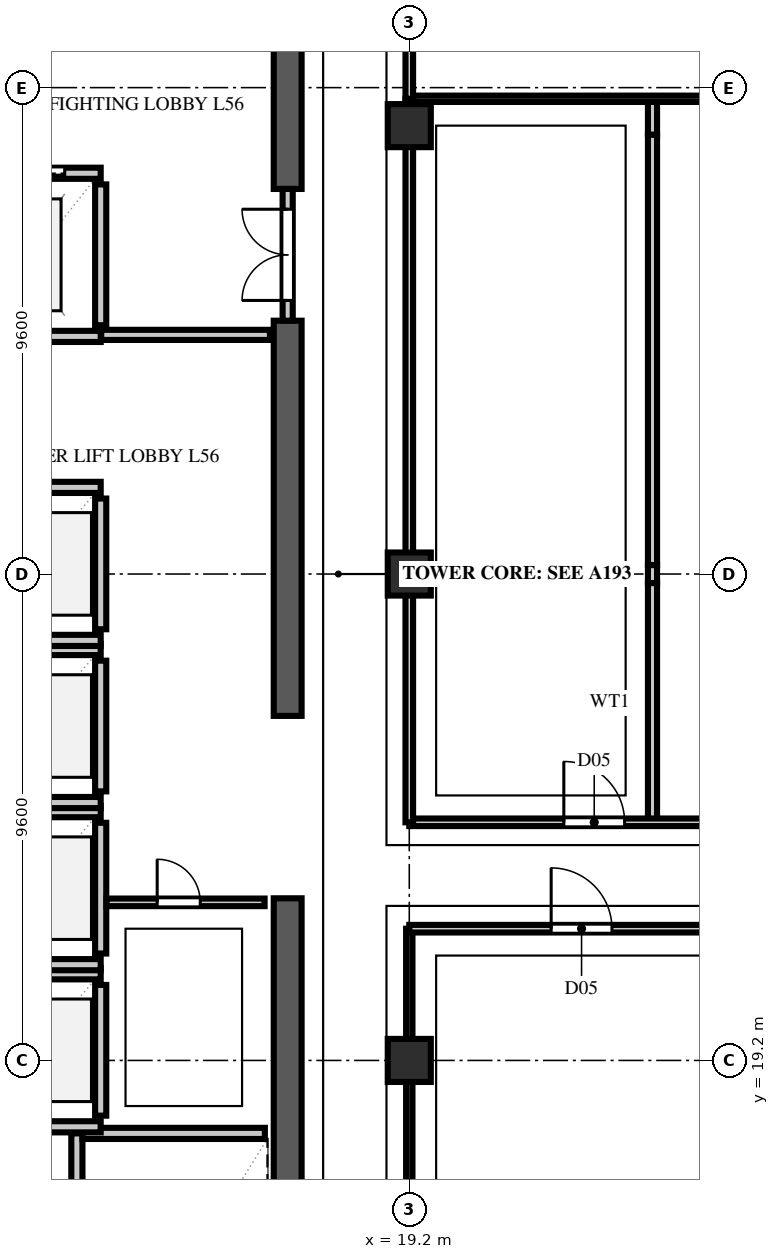
"""IFC4 building model, lengths in metres.
Left out: names, types, materials, properties, quantities, classifications, styles, units other than length and angle.
Written with IfcOpenShell. Run it as: python <this file> out.ifc"""

import sys

from ifc_helpers import new_model, si_unit, direction, frame, frame_2d, origin, origin_2d, place, context, subcontext, project, spatial, rectangle, extrude, element, fill, save


model = new_model("IFC4")
c1 = context("Model", 3, precision=1e-05, world=origin(), true_north=direction((0.0, 1.0)))
c2 = subcontext(c1, "Body", "Model", "MODEL_VIEW")
j1 = project(units=[si_unit("LENGTHUNIT", "METRE"), si_unit("PLANEANGLEUNIT", "RADIAN")], contexts=[c1])
p1 = place(None, origin())
s1 = spatial("IfcSite", under=j1, at=p1, CompositionType="ELEMENT")
p2 = place(p1, origin())
s2 = spatial("IfcBuilding", under=s1, at=p2, CompositionType="ELEMENT")
p3 = place(p2, frame((0.0, 0.0, 221.8)))
s3 = spatial("IfcBuildingStorey", under=s2, at=p3, CompositionType="ELEMENT", Elevation=221.8)
p4 = place(p3, frame((16.8, 9.875, 0.0), z_axis=(0.0, 0.0, 1.0), x_axis=(0.0, 1.0, 0.0)))
e1 = element("IfcWall", 1, at=p4, inside=s3, PredefinedType="SHEAR", context=c2, shape_type="SweptSolid", body=[
    extrude(rectangle(XDim=12.525, YDim=0.55, at=frame_2d((6.262, 0.0))), origin(), (0.0, 0.0, 1.0), 3.54),
])
p5 = place(p4, frame((0.265, 0.0, 0.0)))
e2 = element("IfcOpeningElement", 2, at=p5, cuts=e1, PredefinedType="OPENING", context=c2, shape_type="SweptSolid", body=[
    extrude(rectangle(XDim=1.1, YDim=2.2, at=frame_2d((0.55, 1.1))), frame((0.0, 0.287, 0.0), z_axis=(0.0, -1.0, 0.0), x_axis=(1.0, 0.0, 0.0)), (0.0, 0.0, 1.0), 0.574),
])
p6 = place(p3, frame((16.8, 26.0, 0.0), z_axis=(0.0, 0.0, 1.0), x_axis=(0.0, 1.0, 0.0)))
e3 = element("IfcWall", 3, at=p6, inside=s3, PredefinedType="SHEAR", context=c2, shape_type="SweptSolid", body=[
    extrude(rectangle(XDim=7.8, YDim=0.55, at=frame_2d((3.9, 0.0))), origin(), (0.0, 0.0, 1.0), 3.54),
])
p7 = place(p3, frame((16.8, 36.4, 0.0), z_axis=(0.0, 0.0, 1.0), x_axis=(0.0, 1.0, 0.0)))
e4 = element("IfcWall", 4, at=p7, inside=s3, PredefinedType="SHEAR", context=c2, shape_type="SweptSolid", body=[
    extrude(rectangle(XDim=11.325, YDim=0.55, at=frame_2d((5.663, 0.0))), origin(), (0.0, 0.0, 1.0), 3.54),
])
p8 = place(p7, frame((9.2, 0.0, 0.0)))
e5 = element("IfcOpeningElement", 5, at=p8, cuts=e4, PredefinedType="OPENING", context=c2, shape_type="SweptSolid", body=[
    extrude(rectangle(XDim=0.95, YDim=2.15, at=frame_2d((0.475, 1.075))), frame((0.0, 0.287, 0.0), z_axis=(0.0, -1.0, 0.0), x_axis=(1.0, 0.0, 0.0)), (0.0, 0.0, 1.0), 0.574),
])
for number, where, z_axis, x_axis in (
    (6, (19.2, 19.2, 0.0), (0.0, 0.0, 1.0), (1.0, 0.0, 0.0)),
    (7, (19.2, 28.8, 0.0), (0.0, 0.0, 1.0), (1.0, 0.0, 0.0)),
    (8, (19.2, 37.65, 0.0), (0.0, 0.0, 1.0), (1.0, 0.0, 0.0)),
):
    element("IfcColumn", number, at=place(p3, frame(where, z_axis=z_axis, x_axis=x_axis)), inside=s3, PredefinedType="COLUMN", context=c2, shape_type="SweptSolid", body=[
        extrude(rectangle(XDim=0.85, YDim=0.85, at=origin_2d()), origin(), (0.0, 0.0, 1.0), 3.8),
    ])
p9 = place(p3, frame((12.64, 10.05, 0.0), z_axis=(0.0, 0.0, 1.0), x_axis=(0.0, 1.0, 0.0)))
e9 = element("IfcWall", 9, at=p9, inside=s3, PredefinedType="SOLIDWALL", context=c2, shape_type="SweptSolid", body=[
    extrude(rectangle(XDim=7.71, YDim=0.22, at=frame_2d((3.855, 0.0))), origin(), (0.0, 0.0, 1.0), 3.54),
])
p10 = place(p3, frame((12.75, 17.76, 0.0), z_axis=(0.0, 0.0, 1.0), x_axis=(1.0, 0.0, 0.0)))
e10 = element("IfcWall", 10, at=p10, inside=s3, PredefinedType="SOLIDWALL", context=c2, shape_type="SweptSolid", body=[
    extrude(rectangle(XDim=3.6, YDim=0.22, at=frame_2d((1.8, 0.0))), origin(), (0.0, 0.0, 1.0), 3.54),
])
p11 = place(p3, frame((13.11, 18.11, 0.0), z_axis=(0.0, 0.0, 1.0), x_axis=(0.0, 1.0, 0.0)))
e11 = element("IfcWall", 11, at=p11, inside=s3, PredefinedType="SOLIDWALL", context=c2, shape_type="SweptSolid", body=[
    extrude(rectangle(XDim=2.58, YDim=0.22, at=frame_2d((1.29, 0.0))), origin(), (0.0, 0.0, 1.0), 3.54),
])
for number, where, z_axis, x_axis in (
    (12, (10.49, 17.89, 0.0), (0.0, 0.0, 1.0), (1.0, 0.0, 0.0)),
    (13, (10.49, 20.91, 0.0), (0.0, 0.0, 1.0), (1.0, 0.0, 0.0)),
):
    element("IfcWall", number, at=place(p3, frame(where, z_axis=z_axis, x_axis=x_axis)), inside=s3, PredefinedType="SOLIDWALL", context=c2, shape_type="SweptSolid", body=[
        extrude(rectangle(XDim=2.62, YDim=0.22, at=frame_2d((1.31, 0.0))), origin(), (0.0, 0.0, 1.0), 3.54),
    ])
p12 = place(p3, frame((13.11, 21.31, 0.0), z_axis=(0.0, 0.0, 1.0), x_axis=(0.0, 1.0, 0.0)))
e14 = element("IfcWall", 14, at=p12, inside=s3, PredefinedType="SOLIDWALL", context=c2, shape_type="SweptSolid", body=[
    extrude(rectangle(XDim=2.58, YDim=0.22, at=frame_2d((1.29, 0.0))), origin(), (0.0, 0.0, 1.0), 3.54),
])
for number, where, z_axis, x_axis in (
    (15, (10.49, 21.09, 0.0), (0.0, 0.0, 1.0), (1.0, 0.0, 0.0)),
    (16, (10.49, 24.11, 0.0), (0.0, 0.0, 1.0), (1.0, 0.0, 0.0)),
):
    element("IfcWall", number, at=place(p3, frame(where, z_axis=z_axis, x_axis=x_axis)), inside=s3, PredefinedType="SOLIDWALL", context=c2, shape_type="SweptSolid", body=[
        extrude(rectangle(XDim=2.62, YDim=0.22, at=frame_2d((1.31, 0.0))), origin(), (0.0, 0.0, 1.0), 3.54),
    ])
p13 = place(p3, frame((13.11, 24.51, 0.0), z_axis=(0.0, 0.0, 1.0), x_axis=(0.0, 1.0, 0.0)))
e17 = element("IfcWall", 17, at=p13, inside=s3, PredefinedType="SOLIDWALL", context=c2, shape_type="SweptSolid", body=[
    extrude(rectangle(XDim=2.58, YDim=0.22, at=frame_2d((1.29, 0.0))), origin(), (0.0, 0.0, 1.0), 3.54),
])
for number, where, z_axis, x_axis in (
    (18, (10.49, 24.29, 0.0), (0.0, 0.0, 1.0), (1.0, 0.0, 0.0)),
    (19, (10.49, 27.31, 0.0), (0.0, 0.0, 1.0), (1.0, 0.0, 0.0)),
):
    element("IfcWall", number, at=place(p3, frame(where, z_axis=z_axis, x_axis=x_axis)), inside=s3, PredefinedType="SOLIDWALL", context=c2, shape_type="SweptSolid", body=[
        extrude(rectangle(XDim=2.62, YDim=0.22, at=frame_2d((1.31, 0.0))), origin(), (0.0, 0.0, 1.0), 3.54),
    ])
p14 = place(p3, frame((13.11, 27.71, 0.0), z_axis=(0.0, 0.0, 1.0), x_axis=(0.0, 1.0, 0.0)))
e20 = element("IfcWall", 20, at=p14, inside=s3, PredefinedType="SOLIDWALL", context=c2, shape_type="SweptSolid", body=[
    extrude(rectangle(XDim=2.58, YDim=0.22, at=frame_2d((1.29, 0.0))), origin(), (0.0, 0.0, 1.0), 3.54),
])
for number, where, z_axis, x_axis in (
    (21, (10.49, 27.49, 0.0), (0.0, 0.0, 1.0), (1.0, 0.0, 0.0)),
    (22, (10.49, 30.51, 0.0), (0.0, 0.0, 1.0), (1.0, 0.0, 0.0)),
):
    element("IfcWall", number, at=place(p3, frame(where, z_axis=z_axis, x_axis=x_axis)), inside=s3, PredefinedType="SOLIDWALL", context=c2, shape_type="SweptSolid", body=[
        extrude(rectangle(XDim=2.62, YDim=0.22, at=frame_2d((1.31, 0.0))), origin(), (0.0, 0.0, 1.0), 3.54),
    ])
p15 = place(p3, frame((13.11, 33.71, 0.0), z_axis=(0.0, 0.0, 1.0), x_axis=(0.0, 1.0, 0.0)))
e23 = element("IfcWall", 23, at=p15, inside=s3, PredefinedType="SOLIDWALL", context=c2, shape_type="SweptSolid", body=[
    extrude(rectangle(XDim=2.78, YDim=0.22, at=frame_2d((1.39, 0.0))), origin(), (0.0, 0.0, 1.0), 3.54),
])
p16 = place(p3, frame((10.49, 33.49, 0.0), z_axis=(0.0, 0.0, 1.0), x_axis=(1.0, 0.0, 0.0)))
e24 = element("IfcWall", 24, at=p16, inside=s3, PredefinedType="SOLIDWALL", context=c2, shape_type="SweptSolid", body=[
    extrude(rectangle(XDim=2.62, YDim=0.22, at=frame_2d((1.31, 0.0))), origin(), (0.0, 0.0, 1.0), 3.54),
])
p17 = place(p3, frame((10.49, 36.71, 0.0), z_axis=(0.0, 0.0, 1.0), x_axis=(1.0, 0.0, 0.0)))
e25 = element("IfcWall", 25, at=p17, inside=s3, PredefinedType="SOLIDWALL", context=c2, shape_type="SweptSolid", body=[
    extrude(rectangle(XDim=2.62, YDim=0.22, at=frame_2d((1.31, 0.0))), origin(), (0.0, 0.0, 1.0), 3.54),
])
p18 = place(p17, frame((0.71, 0.0, 0.0)))
e26 = element("IfcOpeningElement", 26, at=p18, cuts=e25, PredefinedType="OPENING", context=c2, shape_type="SweptSolid", body=[
    extrude(rectangle(XDim=1.2, YDim=2.2, at=frame_2d((0.6, 1.1))), frame((0.0, 0.122, 0.0), z_axis=(0.0, -1.0, 0.0), x_axis=(1.0, 0.0, 0.0)), (0.0, 0.0, 1.0), 0.244),
])
p19 = place(p3, frame((13.12, 33.52, 0.0), z_axis=(0.0, 0.0, 1.0), x_axis=(1.0, 0.0, 0.0)))
e27 = element("IfcWall", 27, at=p19, inside=s3, PredefinedType="SOLIDWALL", context=c2, shape_type="SweptSolid", body=[
    extrude(rectangle(XDim=3.33, YDim=0.2, at=frame_2d((1.665, 0.0))), origin(), (0.0, 0.0, 1.0), 3.54),
])
p20 = place(p3, frame((16.8, 33.8, 0.0), z_axis=(0.0, 0.0, 1.0), x_axis=(0.0, 1.0, 0.0)))
e28 = element("IfcWall", 28, at=p20, inside=s3, PredefinedType="SOLIDWALL", context=c2, shape_type="SweptSolid", body=[
    extrude(rectangle(XDim=2.6, YDim=0.2, at=frame_2d((1.3, 0.0))), origin(), (0.0, 0.0, 1.0), 3.54),
])
p21 = place(p20, frame((0.4, 0.0, 0.0)))
e29 = element("IfcOpeningElement", 29, at=p21, cuts=e28, PredefinedType="OPENING", context=c2, shape_type="SweptSolid", body=[
    extrude(rectangle(XDim=1.8, YDim=2.2, at=frame_2d((0.9, 1.1))), frame((0.0, 0.112, 0.0), z_axis=(0.0, -1.0, 0.0), x_axis=(1.0, 0.0, 0.0)), (0.0, 0.0, 1.0), 0.224),
])
p22 = place(p3, frame((13.225, 22.32, 0.0), z_axis=(0.0, 0.0, 1.0), x_axis=(1.0, 0.0, 0.0)))
e30 = element("IfcWall", 30, at=p22, inside=s3, PredefinedType="PARTITIONING", context=c2, shape_type="SweptSolid", body=[
    extrude(rectangle(XDim=3.12, YDim=0.15, at=frame_2d((1.56, 0.0))), origin(), (0.0, 0.0, 1.0), 3.54),
])
p23 = place(p22, frame((1.0, 0.0, 0.0)))
e31 = element("IfcOpeningElement", 31, at=p23, cuts=e30, PredefinedType="OPENING", context=c2, shape_type="SweptSolid", body=[
    extrude(rectangle(XDim=0.85, YDim=2.1, at=frame_2d((0.425, 1.05))), frame((0.0, 0.087, 0.0), z_axis=(0.0, -1.0, 0.0), x_axis=(1.0, 0.0, 0.0)), (0.0, 0.0, 1.0), 0.174),
])
p24 = place(p3, frame((19.2, 0.75, 0.0), z_axis=(0.0, 0.0, 1.0), x_axis=(0.0, 1.0, 0.0)))
e32 = element("IfcWall", 32, at=p24, inside=s3, PredefinedType="PARTITIONING", context=c2, shape_type="SweptSolid", body=[
    extrude(rectangle(XDim=21.05, YDim=0.125, at=frame_2d((10.525, 0.0))), origin(), (0.0, 0.0, 1.0), 2.845),
])
p25 = place(p3, frame((19.2, 21.8, 0.0), z_axis=(0.0, 0.0, 1.0), x_axis=(1.0, 0.0, 0.0)))
e33 = element("IfcWall", 33, at=p25, inside=s3, PredefinedType="PARTITIONING", context=c2, shape_type="SweptSolid", body=[
    extrude(rectangle(XDim=7.75, YDim=0.15, at=frame_2d((3.875, 0.0))), origin(), (0.0, 0.0, 1.0), 3.54),
])
p26 = place(p25, frame((2.8, 0.0, 0.0)))
e34 = element("IfcOpeningElement", 34, at=p26, cuts=e33, PredefinedType="OPENING", context=c2, shape_type="SweptSolid", body=[
    extrude(rectangle(XDim=1.2, YDim=2.2, at=frame_2d((0.6, 1.1))), frame((0.0, 0.087, 0.0), z_axis=(0.0, -1.0, 0.0), x_axis=(1.0, 0.0, 0.0)), (0.0, 0.0, 1.0), 0.174),
])
p27 = place(p3, frame((24.0, 23.9, 0.0), z_axis=(0.0, 0.0, 1.0), x_axis=(0.0, 1.0, 0.0)))
e35 = element("IfcWall", 35, at=p27, inside=s3, PredefinedType="PARTITIONING", context=c2, shape_type="SweptSolid", body=[
    extrude(rectangle(XDim=4.723, YDim=0.18, at=frame_2d((2.361, 0.0))), origin(), (0.0, 0.0, 1.0), 2.996),
])
p28 = place(p3, frame((24.0, 28.623, 0.0), z_axis=(0.0, 0.0, 1.0), x_axis=(0.0, 1.0, 0.0)))
e36 = element("IfcWall", 36, at=p28, inside=s3, PredefinedType="PARTITIONING", context=c2, shape_type="SweptSolid", body=[
    extrude(rectangle(XDim=0.355, YDim=0.18, at=frame_2d((0.177, 0.0))), origin(), (0.0, 0.0, 1.0), 3.54),
])
p29 = place(p3, frame((24.0, 28.978, 0.0), z_axis=(0.0, 0.0, 1.0), x_axis=(0.0, 1.0, 0.0)))
e37 = element("IfcWall", 37, at=p29, inside=s3, PredefinedType="PARTITIONING", context=c2, shape_type="SweptSolid", body=[
    extrude(rectangle(XDim=8.495, YDim=0.18, at=frame_2d((4.248, 0.0))), origin(), (0.0, 0.0, 1.0), 2.996),
])
p30 = place(p3, frame((24.0, 37.472, 0.0), z_axis=(0.0, 0.0, 1.0), x_axis=(0.0, 1.0, 0.0)))
e38 = element("IfcWall", 38, at=p30, inside=s3, PredefinedType="PARTITIONING", context=c2, shape_type="SweptSolid", body=[
    extrude(rectangle(XDim=0.708, YDim=0.18, at=frame_2d((0.354, 0.0))), origin(), (0.0, 0.0, 1.0), 3.54),
])
p31 = place(p3, frame((19.2, 23.9, 0.0), z_axis=(0.0, 0.0, 1.0), x_axis=(1.0, 0.0, 0.0)))
e39 = element("IfcWall", 39, at=p31, inside=s3, PredefinedType="PARTITIONING", context=c2, shape_type="SweptSolid", body=[
    extrude(rectangle(XDim=38.18, YDim=0.15, at=frame_2d((19.09, 0.0))), origin(), (0.0, 0.0, 1.0), 3.54),
])
p32 = place(p31, frame((3.05, 0.0, 0.0)))
e40 = element("IfcOpeningElement", 40, at=p32, cuts=e39, PredefinedType="OPENING", context=c2, shape_type="SweptSolid", body=[
    extrude(rectangle(XDim=1.2, YDim=2.2, at=frame_2d((0.6, 1.1))), frame((0.0, 0.087, 0.0), z_axis=(0.0, -1.0, 0.0), x_axis=(1.0, 0.0, 0.0)), (0.0, 0.0, 1.0), 0.174),
])
p33 = place(p31, frame((13.6, 0.0, 0.0)))
e41 = element("IfcOpeningElement", 41, at=p33, cuts=e39, PredefinedType="OPENING", context=c2, shape_type="SweptSolid", body=[
    extrude(rectangle(XDim=0.95, YDim=2.15, at=frame_2d((0.475, 1.075))), frame((0.0, 0.087, 0.0), z_axis=(0.0, -1.0, 0.0), x_axis=(1.0, 0.0, 0.0)), (0.0, 0.0, 1.0), 0.174),
])
p34 = place(p31, frame((22.8, 0.0, 0.0)))
e42 = element("IfcOpeningElement", 42, at=p34, cuts=e39, PredefinedType="OPENING", context=c2, shape_type="SweptSolid", body=[
    extrude(rectangle(XDim=0.95, YDim=2.15, at=frame_2d((0.475, 1.075))), frame((0.0, 0.087, 0.0), z_axis=(0.0, -1.0, 0.0), x_axis=(1.0, 0.0, 0.0)), (0.0, 0.0, 1.0), 0.174),
])
p35 = place(p31, frame((32.05, 0.0, 0.0)))
e43 = element("IfcOpeningElement", 43, at=p35, cuts=e39, PredefinedType="OPENING", context=c2, shape_type="SweptSolid", body=[
    extrude(rectangle(XDim=1.0, YDim=2.2, at=frame_2d((0.5, 1.1))), frame((0.0, 0.087, 0.0), z_axis=(0.0, -1.0, 0.0), x_axis=(1.0, 0.0, 0.0)), (0.0, 0.0, 1.0), 0.174),
])
p36 = place(p3, frame((19.2, 23.9, 0.0), z_axis=(0.0, 0.0, 1.0), x_axis=(0.0, 1.0, 0.0)))
e44 = element("IfcWall", 44, at=p36, inside=s3, PredefinedType="PARTITIONING", context=c2, shape_type="SweptSolid", body=[
    extrude(rectangle(XDim=14.28, YDim=0.15, at=frame_2d((7.14, 0.0))), origin(), (0.0, 0.0, 1.0), 2.845),
])
p37 = place(p3, frame((19.28, 38.18, 0.0), z_axis=(0.0, 0.0, 1.0), x_axis=(1.0, 0.0, 0.0)))
e45 = element("IfcWall", 45, at=p37, inside=s3, PredefinedType="PARTITIONING", context=c2, shape_type="SweptSolid", body=[
    extrude(rectangle(XDim=18.37, YDim=0.125, at=frame_2d((9.185, 0.0))), origin(), (0.0, 0.0, 1.0), 3.54),
])
p38 = place(p3, frame((19.2, 38.18, 0.0), z_axis=(0.0, 0.0, 1.0), x_axis=(0.0, 1.0, 0.0)))
e46 = element("IfcWall", 46, at=p38, inside=s3, PredefinedType="PARTITIONING", context=c2, shape_type="SweptSolid", body=[
    extrude(rectangle(XDim=18.67, YDim=0.15, at=frame_2d((9.335, 0.0))), origin(), (0.0, 0.0, 1.0), 2.845),
])
p39 = place(p38, frame((3.75, 0.0, 0.0)))
e47 = element("IfcOpeningElement", 47, at=p39, cuts=e46, PredefinedType="OPENING", context=c2, shape_type="SweptSolid", body=[
    extrude(rectangle(XDim=0.95, YDim=2.15, at=frame_2d((0.475, 1.075))), frame((0.0, 0.087, 0.0), z_axis=(0.0, -1.0, 0.0), x_axis=(1.0, 0.0, 0.0)), (0.0, 0.0, 1.0), 0.174),
])
p40 = place(p18, origin())
e48 = element("IfcDoor", 48, at=p40, inside=s3, OperationType="DOUBLE_DOOR_SLIDING", PredefinedType="DOOR", context=c2, shape_type="SweptSolid", body=[
    extrude(rectangle(XDim=1.2, YDim=2.2, at=frame_2d((0.6, 1.1))), frame((0.0, 0.025, 0.0), z_axis=(0.0, -1.0, 0.0), x_axis=(1.0, 0.0, 0.0)), (0.0, 0.0, 1.0), 0.05),
])
fill(e26, e48)
p41 = place(p21, origin())
e49 = element("IfcDoor", 49, at=p41, inside=s3, OperationType="DOUBLE_DOOR_SINGLE_SWING", PredefinedType="DOOR", context=c2, shape_type="SweptSolid", body=[
    extrude(rectangle(XDim=1.8, YDim=2.2, at=frame_2d((0.9, 1.1))), frame((0.0, 0.025, 0.0), z_axis=(0.0, -1.0, 0.0), x_axis=(1.0, 0.0, 0.0)), (0.0, 0.0, 1.0), 0.05),
])
fill(e29, e49)
p42 = place(p23, origin())
e50 = element("IfcDoor", 50, at=p42, inside=s3, OperationType="SINGLE_SWING_LEFT", PredefinedType="DOOR", context=c2, shape_type="SweptSolid", body=[
    extrude(rectangle(XDim=0.85, YDim=2.1, at=frame_2d((0.425, 1.05))), frame((0.0, 0.025, 0.0), z_axis=(0.0, -1.0, 0.0), x_axis=(1.0, 0.0, 0.0)), (0.0, 0.0, 1.0), 0.05),
])
fill(e31, e50)
p43 = place(p26, origin())
e51 = element("IfcDoor", 51, at=p43, inside=s3, OperationType="SINGLE_SWING_LEFT", PredefinedType="DOOR", context=c2, shape_type="SweptSolid", body=[
    extrude(rectangle(XDim=1.2, YDim=2.2, at=frame_2d((0.6, 1.1))), frame((0.0, 0.025, 0.0), z_axis=(0.0, -1.0, 0.0), x_axis=(1.0, 0.0, 0.0)), (0.0, 0.0, 1.0), 0.05),
])
fill(e34, e51)
p44 = place(p32, origin())
e52 = element("IfcDoor", 52, at=p44, inside=s3, OperationType="SINGLE_SWING_LEFT", PredefinedType="DOOR", context=c2, shape_type="SweptSolid", body=[
    extrude(rectangle(XDim=1.2, YDim=2.2, at=frame_2d((0.6, 1.1))), frame((0.0, 0.025, 0.0), z_axis=(0.0, -1.0, 0.0), x_axis=(1.0, 0.0, 0.0)), (0.0, 0.0, 1.0), 0.05),
])
fill(e40, e52)
save(model, sys.argv[1])
